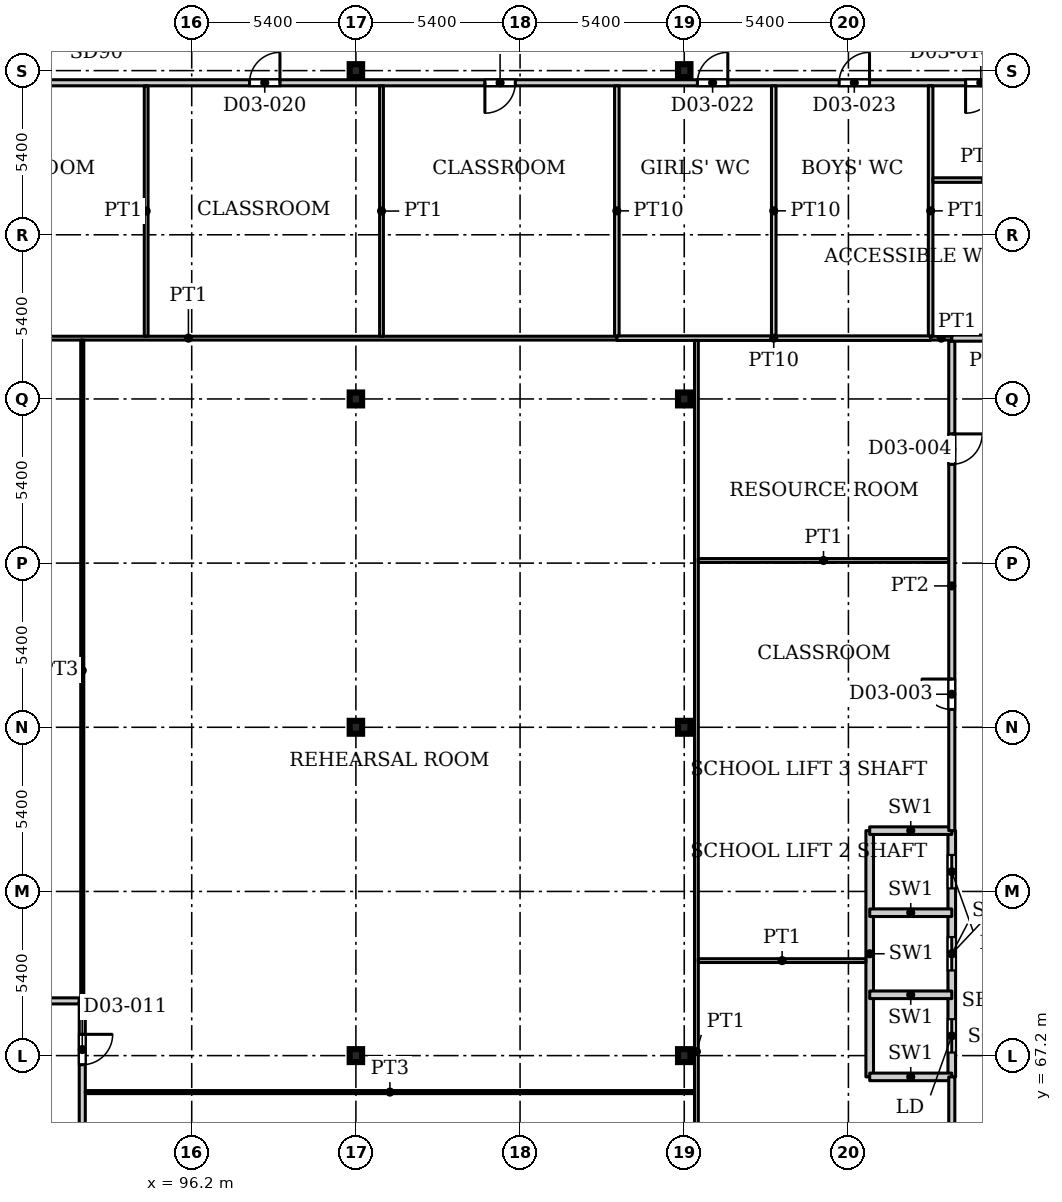
"""IFC4 building model, lengths in metres.
Left out: names, types, materials, properties, quantities, classifications, styles, units other than length and angle.
Written with IfcOpenShell. Run it as: python <this file> out.ifc"""

import sys

from ifc_helpers import new_model, si_unit, direction, frame, frame_2d, origin, origin_2d, place, context, subcontext, project, spatial, rectangle, i_section, extrude, source, transform, mapped, element, fill, save


model = new_model("IFC4")
c1 = context("Model", 3, precision=1e-05, world=origin(), true_north=direction((0.0, 1.0)))
c2 = subcontext(c1, "Body", "Model", "MODEL_VIEW")
j1 = project(units=[si_unit("LENGTHUNIT", "METRE"), si_unit("PLANEANGLEUNIT", "RADIAN")], contexts=[c1])
p1 = place(None, origin())
s1 = spatial("IfcSite", under=j1, at=p1, CompositionType="ELEMENT")
p2 = place(p1, origin())
s2 = spatial("IfcBuilding", under=s1, at=p2, CompositionType="ELEMENT")
p3 = place(p2, frame((0.0, 0.0, 17.0)))
s3 = spatial("IfcBuildingStorey", under=s2, at=p3, CompositionType="ELEMENT", Elevation=17.0)
for number, where, z_axis, x_axis in (
    (1, (101.6, 67.2, 0.0), (0.0, 0.0, 1.0), (1.0, 0.0, 0.0)),
    (2, (112.4, 67.2, 0.0), (0.0, 0.0, 1.0), (1.0, 0.0, 0.0)),
    (3, (101.6, 78.0, 0.0), (0.0, 0.0, 1.0), (1.0, 0.0, 0.0)),
    (4, (112.4, 78.0, 0.0), (0.0, 0.0, 1.0), (1.0, 0.0, 0.0)),
    (5, (101.6, 88.8, 0.0), (0.0, 0.0, 1.0), (1.0, 0.0, 0.0)),
    (6, (112.4, 88.8, 0.0), (0.0, 0.0, 1.0), (1.0, 0.0, 0.0)),
    (7, (101.6, 99.6, 0.0), (0.0, 0.0, 1.0), (1.0, 0.0, 0.0)),
    (8, (112.4, 99.6, 0.0), (0.0, 0.0, 1.0), (1.0, 0.0, 0.0)),
):
    element("IfcColumn", number, at=place(p3, frame(where, z_axis=z_axis, x_axis=x_axis)), inside=s3, PredefinedType="COLUMN", context=c2, shape_type="SweptSolid", body=[
        extrude(i_section(OverallWidth=0.409, OverallDepth=0.425, WebThickness=0.033, FlangeThickness=0.052, FilletRadius=0.013, at=origin_2d()), origin(), (0.0, 0.0, 1.0), 4.5),
    ])
p4 = place(p3, frame((118.5, 66.5, 0.0), z_axis=(0.0, 0.0, 1.0), x_axis=(0.0, 1.0, 0.0)))
e9 = element("IfcWall", 9, at=p4, inside=s3, PredefinedType="PARTITIONING", context=c2, shape_type="SweptSolid", body=[
    extrude(rectangle(XDim=8.1, YDim=0.25, at=frame_2d((4.05, 0.0))), origin(), (0.0, 0.0, 1.0), 4.5),
])
p5 = place(p3, frame((121.2, 66.5, 0.0), z_axis=(0.0, 0.0, 1.0), x_axis=(0.0, 1.0, 0.0)))
e10 = element("IfcWall", 10, at=p5, inside=s3, PredefinedType="PARTITIONING", context=c2, shape_type="SweptSolid", body=[
    extrude(rectangle(XDim=8.1, YDim=0.25, at=frame_2d((4.05, 0.0))), origin(), (0.0, 0.0, 1.0), 4.5),
])
p6 = place(p5, frame((0.8, 0.0, 0.0)))
e11 = element("IfcOpeningElement", 11, at=p6, cuts=e10, PredefinedType="OPENING", context=c2, shape_type="SweptSolid", body=[
    extrude(rectangle(XDim=1.1, YDim=2.2, at=frame_2d((0.55, 1.1))), frame((0.0, 0.135, 0.0), z_axis=(0.0, -1.0, 0.0), x_axis=(1.0, 0.0, 0.0)), (0.0, 0.0, 1.0), 0.27),
])
p7 = place(p5, frame((3.5, 0.0, 0.0)))
e12 = element("IfcOpeningElement", 12, at=p7, cuts=e10, PredefinedType="OPENING", context=c2, shape_type="SweptSolid", body=[
    extrude(rectangle(XDim=1.1, YDim=2.2, at=frame_2d((0.55, 1.1))), frame((0.0, 0.135, 0.0), z_axis=(0.0, -1.0, 0.0), x_axis=(1.0, 0.0, 0.0)), (0.0, 0.0, 1.0), 0.27),
])
p8 = place(p5, frame((6.2, 0.0, 0.0)))
e13 = element("IfcOpeningElement", 13, at=p8, cuts=e10, PredefinedType="OPENING", context=c2, shape_type="SweptSolid", body=[
    extrude(rectangle(XDim=1.1, YDim=2.2, at=frame_2d((0.55, 1.1))), frame((0.0, 0.135, 0.0), z_axis=(0.0, -1.0, 0.0), x_axis=(1.0, 0.0, 0.0)), (0.0, 0.0, 1.0), 0.27),
])
for number, where, z_axis, x_axis in (
    (14, (118.5, 66.5, 0.0), (0.0, 0.0, 1.0), (1.0, 0.0, 0.0)),
    (15, (118.5, 69.2, 0.0), (0.0, 0.0, 1.0), (1.0, 0.0, 0.0)),
    (16, (118.5, 71.9, 0.0), (0.0, 0.0, 1.0), (1.0, 0.0, 0.0)),
    (17, (118.5, 74.6, 0.0), (0.0, 0.0, 1.0), (1.0, 0.0, 0.0)),
):
    element("IfcWall", number, at=place(p3, frame(where, z_axis=z_axis, x_axis=x_axis)), inside=s3, PredefinedType="PARTITIONING", context=c2, shape_type="SweptSolid", body=[
        extrude(rectangle(XDim=2.7, YDim=0.25, at=frame_2d((1.35, 0.0))), origin(), (0.0, 0.0, 1.0), 4.5),
    ])
p9 = place(p3, frame((56.1, 99.2, 0.0), z_axis=(0.0, 0.0, 1.0), x_axis=(1.0, 0.0, 0.0)))
e18 = element("IfcWall", 18, at=p9, inside=s3, PredefinedType="PARTITIONING", context=c2, shape_type="SweptSolid", body=[
    extrude(rectangle(XDim=67.5, YDim=0.2, at=frame_2d((33.75, 0.0))), origin(), (0.0, 0.0, 1.0), 4.18),
])
p10 = place(p9, frame((4.05, 0.0, 0.0)))
e19 = element("IfcOpeningElement", 19, at=p10, cuts=e18, PredefinedType="OPENING", context=c2, shape_type="SweptSolid", body=[
    extrude(rectangle(XDim=1.0, YDim=2.1, at=frame_2d((0.5, 1.05))), frame((0.0, 0.11, 0.0), z_axis=(0.0, -1.0, 0.0), x_axis=(1.0, 0.0, 0.0)), (0.0, 0.0, 1.0), 0.22),
])
p11 = place(p9, frame((65.554, 0.0, 0.0)))
e20 = element("IfcOpeningElement", 20, at=p11, cuts=e18, PredefinedType="OPENING", context=c2, shape_type="SweptSolid", body=[
    extrude(rectangle(XDim=1.0, YDim=2.1, at=frame_2d((0.5, 1.05))), frame((0.0, 0.11, 0.0), z_axis=(0.0, -1.0, 0.0), x_axis=(1.0, 0.0, 0.0)), (0.0, 0.0, 1.0), 0.22),
])
p12 = place(p9, frame((11.589, 0.0, 0.0)))
e21 = element("IfcOpeningElement", 21, at=p12, cuts=e18, PredefinedType="OPENING", context=c2, shape_type="SweptSolid", body=[
    extrude(rectangle(XDim=1.0, YDim=2.1, at=frame_2d((0.5, 1.05))), frame((0.0, 0.11, 0.0), z_axis=(0.0, -1.0, 0.0), x_axis=(1.0, 0.0, 0.0)), (0.0, 0.0, 1.0), 0.22),
])
p13 = place(p9, frame((20.329, 0.0, 0.0)))
e22 = element("IfcOpeningElement", 22, at=p13, cuts=e18, PredefinedType="OPENING", context=c2, shape_type="SweptSolid", body=[
    extrude(rectangle(XDim=1.0, YDim=2.1, at=frame_2d((0.5, 1.05))), frame((0.0, 0.11, 0.0), z_axis=(0.0, -1.0, 0.0), x_axis=(1.0, 0.0, 0.0)), (0.0, 0.0, 1.0), 0.22),
])
p14 = place(p9, frame((27.319, 0.0, 0.0)))
e23 = element("IfcOpeningElement", 23, at=p14, cuts=e18, PredefinedType="OPENING", context=c2, shape_type="SweptSolid", body=[
    extrude(rectangle(XDim=1.0, YDim=2.1, at=frame_2d((0.5, 1.05))), frame((0.0, 0.11, 0.0), z_axis=(0.0, -1.0, 0.0), x_axis=(1.0, 0.0, 0.0)), (0.0, 0.0, 1.0), 0.22),
])
p15 = place(p9, frame((33.262, 0.0, 0.0)))
e24 = element("IfcOpeningElement", 24, at=p15, cuts=e18, PredefinedType="OPENING", context=c2, shape_type="SweptSolid", body=[
    extrude(rectangle(XDim=1.0, YDim=2.1, at=frame_2d((0.5, 1.05))), frame((0.0, 0.11, 0.0), z_axis=(0.0, -1.0, 0.0), x_axis=(1.0, 0.0, 0.0)), (0.0, 0.0, 1.0), 0.22),
])
p16 = place(p9, frame((42.002, 0.0, 0.0)))
e25 = element("IfcOpeningElement", 25, at=p16, cuts=e18, PredefinedType="OPENING", context=c2, shape_type="SweptSolid", body=[
    extrude(rectangle(XDim=1.0, YDim=2.1, at=frame_2d((0.5, 1.05))), frame((0.0, 0.11, 0.0), z_axis=(0.0, -1.0, 0.0), x_axis=(1.0, 0.0, 0.0)), (0.0, 0.0, 1.0), 0.22),
])
p17 = place(p9, frame((49.743, 0.0, 0.0)))
e26 = element("IfcOpeningElement", 26, at=p17, cuts=e18, PredefinedType="OPENING", context=c2, shape_type="SweptSolid", body=[
    extrude(rectangle(XDim=1.0, YDim=2.1, at=frame_2d((0.5, 1.05))), frame((0.0, 0.11, 0.0), z_axis=(0.0, -1.0, 0.0), x_axis=(1.0, 0.0, 0.0)), (0.0, 0.0, 1.0), 0.22),
])
p18 = place(p9, frame((56.733, 0.0, 0.0)))
e27 = element("IfcOpeningElement", 27, at=p18, cuts=e18, PredefinedType="OPENING", context=c2, shape_type="SweptSolid", body=[
    extrude(rectangle(XDim=1.0, YDim=2.1, at=frame_2d((0.5, 1.05))), frame((0.0, 0.11, 0.0), z_axis=(0.0, -1.0, 0.0), x_axis=(1.0, 0.0, 0.0)), (0.0, 0.0, 1.0), 0.22),
])
p19 = place(p9, frame((61.394, 0.0, 0.0)))
e28 = element("IfcOpeningElement", 28, at=p19, cuts=e18, PredefinedType="OPENING", context=c2, shape_type="SweptSolid", body=[
    extrude(rectangle(XDim=1.0, YDim=2.1, at=frame_2d((0.5, 1.05))), frame((0.0, 0.11, 0.0), z_axis=(0.0, -1.0, 0.0), x_axis=(1.0, 0.0, 0.0)), (0.0, 0.0, 1.0), 0.22),
])
p20 = place(p3, frame((67.5, 69.0, 0.0), z_axis=(0.0, 0.0, 1.0), x_axis=(1.0, 0.0, 0.0)))
e29 = element("IfcWall", 29, at=p20, inside=s3, PredefinedType="PARTITIONING", context=c2, shape_type="SweptSolid", body=[
    extrude(rectangle(XDim=25.0, YDim=0.2, at=frame_2d((12.5, 0.0))), origin(), (0.0, 0.0, 1.0), 4.18),
])
p21 = place(p20, frame((11.4, 0.0, 0.0)))
e30 = element("IfcOpeningElement", 30, at=p21, cuts=e29, PredefinedType="OPENING", context=c2, shape_type="SweptSolid", body=[
    extrude(rectangle(XDim=2.0, YDim=2.1, at=frame_2d((1.0, 1.05))), frame((0.0, 0.11, 0.0), z_axis=(0.0, -1.0, 0.0), x_axis=(1.0, 0.0, 0.0)), (0.0, 0.0, 1.0), 0.22),
])
p22 = place(p20, frame((4.3, 0.0, 0.0)))
e31 = element("IfcOpeningElement", 31, at=p22, cuts=e29, PredefinedType="OPENING", context=c2, shape_type="SweptSolid", body=[
    extrude(rectangle(XDim=1.8, YDim=2.1, at=frame_2d((0.9, 1.05))), frame((0.0, 0.11, 0.0), z_axis=(0.0, -1.0, 0.0), x_axis=(1.0, 0.0, 0.0)), (0.0, 0.0, 1.0), 0.22),
])
p23 = place(p20, frame((18.9, 0.0, 0.0)))
e32 = element("IfcOpeningElement", 32, at=p23, cuts=e29, PredefinedType="OPENING", context=c2, shape_type="SweptSolid", body=[
    extrude(rectangle(XDim=1.8, YDim=2.1, at=frame_2d((0.9, 1.05))), frame((0.0, 0.11, 0.0), z_axis=(0.0, -1.0, 0.0), x_axis=(1.0, 0.0, 0.0)), (0.0, 0.0, 1.0), 0.22),
])
p24 = place(p3, frame((82.0, 90.8, 0.0), z_axis=(0.0, 0.0, 1.0), x_axis=(1.0, 0.0, 0.0)))
e33 = element("IfcWall", 33, at=p24, inside=s3, PredefinedType="PARTITIONING", context=c2, shape_type="SweptSolid", body=[
    extrude(rectangle(XDim=28.183, YDim=0.125, at=frame_2d((14.092, 0.0))), origin(), (0.0, 0.0, 1.0), 4.18),
])
p25 = place(p3, frame((92.6, 48.1, 0.0), z_axis=(0.0, 0.0, 1.0), x_axis=(0.0, 1.0, 0.0)))
e34 = element("IfcWall", 34, at=p25, inside=s3, PredefinedType="PARTITIONING", context=c2, shape_type="SweptSolid", body=[
    extrude(rectangle(XDim=20.9, YDim=0.2, at=frame_2d((10.45, 0.0))), origin(), (0.0, 0.0, 1.0), 4.18),
])
p26 = place(p25, frame((8.05, 0.0, 0.0)))
e35 = element("IfcOpeningElement", 35, at=p26, cuts=e34, PredefinedType="OPENING", context=c2, shape_type="SweptSolid", body=[
    extrude(rectangle(XDim=1.8, YDim=2.1, at=frame_2d((0.9, 1.05))), frame((0.0, 0.11, 0.0), z_axis=(0.0, -1.0, 0.0), x_axis=(1.0, 0.0, 0.0)), (0.0, 0.0, 1.0), 0.22),
])
p27 = place(p25, frame((18.8, 0.0, 0.0)))
e36 = element("IfcOpeningElement", 36, at=p27, cuts=e34, PredefinedType="OPENING", context=c2, shape_type="SweptSolid", body=[
    extrude(rectangle(XDim=1.0, YDim=2.1, at=frame_2d((0.5, 1.05))), frame((0.0, 0.11, 0.0), z_axis=(0.0, -1.0, 0.0), x_axis=(1.0, 0.0, 0.0)), (0.0, 0.0, 1.0), 0.22),
])
p28 = place(p3, frame((92.6, 69.0, 0.0), z_axis=(0.0, 0.0, 1.0), x_axis=(0.0, 1.0, 0.0)))
e37 = element("IfcWall", 37, at=p28, inside=s3, PredefinedType="PARTITIONING", context=c2, shape_type="SweptSolid", body=[
    extrude(rectangle(XDim=21.738, YDim=0.1, at=frame_2d((10.869, 0.0))), origin(), (0.0, 0.0, 1.0), 4.18),
])
p29 = place(p3, frame((92.7, 66.0, 0.0), z_axis=(0.0, 0.0, 1.0), x_axis=(1.0, 0.0, 0.0)))
e38 = element("IfcWall", 38, at=p29, inside=s3, PredefinedType="PARTITIONING", context=c2, shape_type="SweptSolid", body=[
    extrude(rectangle(XDim=20.038, YDim=0.1, at=frame_2d((10.019, 0.0))), origin(), (0.0, 0.0, 1.0), 4.18),
])
for number, where, z_axis, x_axis in (
    (39, (94.702, 90.862, 0.0), (0.0, 0.0, 1.0), (0.0, 1.0, 0.0)),
    (40, (102.443, 90.862, 0.0), (0.0, 0.0, 1.0), (0.0, 1.0, 0.0)),
):
    element("IfcWall", number, at=place(p3, frame(where, z_axis=z_axis, x_axis=x_axis)), inside=s3, PredefinedType="PARTITIONING", context=c2, shape_type="SweptSolid", body=[
        extrude(rectangle(XDim=8.238, YDim=0.125, at=frame_2d((4.119, 0.0))), origin(), (0.0, 0.0, 1.0), 4.18),
    ])
p30 = place(p3, frame((110.183, 90.8, 0.0), z_axis=(0.0, 0.0, 1.0), x_axis=(1.0, 0.0, 0.0)))
e41 = element("IfcWall", 41, at=p30, inside=s3, PredefinedType="PARTITIONING", context=c2, shape_type="SweptSolid", body=[
    extrude(rectangle(XDim=10.321, YDim=0.15, at=frame_2d((5.16, 0.0))), origin(), (0.0, 0.0, 1.0), 4.18),
])
p31 = place(p3, frame((110.183, 90.875, 0.0), z_axis=(0.0, 0.0, 1.0), x_axis=(0.0, 1.0, 0.0)))
e42 = element("IfcWall", 42, at=p31, inside=s3, PredefinedType="PARTITIONING", context=c2, shape_type="SweptSolid", body=[
    extrude(rectangle(XDim=8.225, YDim=0.15, at=frame_2d((4.113, 0.0))), origin(), (0.0, 0.0, 1.0), 4.18),
])
p32 = place(p3, frame((112.8, 43.938, 0.0), z_axis=(0.0, 0.0, 1.0), x_axis=(0.0, 1.0, 0.0)))
e43 = element("IfcWall", 43, at=p32, inside=s3, PredefinedType="PARTITIONING", context=c2, shape_type="SweptSolid", body=[
    extrude(rectangle(XDim=46.787, YDim=0.125, at=frame_2d((23.394, 0.0))), origin(), (0.0, 0.0, 1.0), 4.18),
])
p33 = place(p3, frame((112.862, 70.325, 0.0), z_axis=(0.0, 0.0, 1.0), x_axis=(1.0, 0.0, 0.0)))
e44 = element("IfcWall", 44, at=p33, inside=s3, PredefinedType="PARTITIONING", context=c2, shape_type="SweptSolid", body=[
    extrude(rectangle(XDim=5.514, YDim=0.125, at=frame_2d((2.757, 0.0))), origin(), (0.0, 0.0, 1.0), 4.18),
])
p34 = place(p3, frame((112.862, 83.487, 0.0), z_axis=(0.0, 0.0, 1.0), x_axis=(1.0, 0.0, 0.0)))
e45 = element("IfcWall", 45, at=p34, inside=s3, PredefinedType="PARTITIONING", context=c2, shape_type="SweptSolid", body=[
    extrude(rectangle(XDim=8.238, YDim=0.125, at=frame_2d((4.119, 0.0))), origin(), (0.0, 0.0, 1.0), 4.18),
])
p35 = place(p3, frame((115.344, 90.875, 0.0), z_axis=(0.0, 0.0, 1.0), x_axis=(0.0, 1.0, 0.0)))
e46 = element("IfcWall", 46, at=p35, inside=s3, PredefinedType="PARTITIONING", context=c2, shape_type="SweptSolid", body=[
    extrude(rectangle(XDim=8.225, YDim=0.15, at=frame_2d((4.113, 0.0))), origin(), (0.0, 0.0, 1.0), 4.18),
])
p36 = place(p3, frame((120.504, 90.8, 0.0), z_axis=(0.0, 0.0, 1.0), x_axis=(1.0, 0.0, 0.0)))
e47 = element("IfcWall", 47, at=p36, inside=s3, PredefinedType="PARTITIONING", context=c2, shape_type="SweptSolid", body=[
    extrude(rectangle(XDim=0.696, YDim=0.125, at=frame_2d((0.348, 0.0))), origin(), (0.0, 0.0, 1.0), 4.18),
])
p37 = place(p3, frame((120.504, 90.875, 0.0), z_axis=(0.0, 0.0, 1.0), x_axis=(0.0, 1.0, 0.0)))
e48 = element("IfcWall", 48, at=p37, inside=s3, PredefinedType="PARTITIONING", context=c2, shape_type="SweptSolid", body=[
    extrude(rectangle(XDim=8.225, YDim=0.15, at=frame_2d((4.113, 0.0))), origin(), (0.0, 0.0, 1.0), 4.18),
])
p38 = place(p3, frame((120.579, 96.0, 0.0), z_axis=(0.0, 0.0, 1.0), x_axis=(1.0, 0.0, 0.0)))
e49 = element("IfcWall", 49, at=p38, inside=s3, PredefinedType="PARTITIONING", context=c2, shape_type="SweptSolid", body=[
    extrude(rectangle(XDim=3.45, YDim=0.15, at=frame_2d((1.725, 0.0))), origin(), (0.0, 0.0, 1.0), 4.18),
])
p39 = place(p3, frame((121.2, 43.9, 0.0), z_axis=(0.0, 0.0, 1.0), x_axis=(0.0, 1.0, 0.0)))
e50 = element("IfcWall", 50, at=p39, inside=s3, PredefinedType="PARTITIONING", context=c2, shape_type="SweptSolid", body=[
    extrude(rectangle(XDim=22.6, YDim=0.2, at=frame_2d((11.3, 0.0))), origin(), (0.0, 0.0, 1.0), 4.18),
])
p40 = place(p39, frame((6.112, 0.0, 0.0)))
e51 = element("IfcOpeningElement", 51, at=p40, cuts=e50, PredefinedType="OPENING", context=c2, shape_type="SweptSolid", body=[
    extrude(rectangle(XDim=1.0, YDim=2.1, at=frame_2d((0.5, 1.05))), frame((0.0, 0.11, 0.0), z_axis=(0.0, -1.0, 0.0), x_axis=(1.0, 0.0, 0.0)), (0.0, 0.0, 1.0), 0.22),
])
p41 = place(p39, frame((17.45, 0.0, 0.0)))
e52 = element("IfcOpeningElement", 52, at=p41, cuts=e50, PredefinedType="OPENING", context=c2, shape_type="SweptSolid", body=[
    extrude(rectangle(XDim=1.0, YDim=2.1, at=frame_2d((0.5, 1.05))), frame((0.0, 0.11, 0.0), z_axis=(0.0, -1.0, 0.0), x_axis=(1.0, 0.0, 0.0)), (0.0, 0.0, 1.0), 0.22),
])
p42 = place(p3, frame((121.2, 74.6, 0.0), z_axis=(0.0, 0.0, 1.0), x_axis=(0.0, 1.0, 0.0)))
e53 = element("IfcWall", 53, at=p42, inside=s3, PredefinedType="PARTITIONING", context=c2, shape_type="SweptSolid", body=[
    extrude(rectangle(XDim=16.1, YDim=0.2, at=frame_2d((8.05, 0.0))), origin(), (0.0, 0.0, 1.0), 4.18),
])
p43 = place(p42, frame((3.987, 0.0, 0.0)))
e54 = element("IfcOpeningElement", 54, at=p43, cuts=e53, PredefinedType="OPENING", context=c2, shape_type="SweptSolid", body=[
    extrude(rectangle(XDim=1.0, YDim=2.1, at=frame_2d((0.5, 1.05))), frame((0.0, 0.11, 0.0), z_axis=(0.0, -1.0, 0.0), x_axis=(1.0, 0.0, 0.0)), (0.0, 0.0, 1.0), 0.22),
])
p44 = place(p42, frame((12.05, 0.0, 0.0)))
e55 = element("IfcOpeningElement", 55, at=p44, cuts=e53, PredefinedType="OPENING", context=c2, shape_type="SweptSolid", body=[
    extrude(rectangle(XDim=1.0, YDim=2.1, at=frame_2d((0.5, 1.05))), frame((0.0, 0.11, 0.0), z_axis=(0.0, -1.0, 0.0), x_axis=(1.0, 0.0, 0.0)), (0.0, 0.0, 1.0), 0.22),
])
p45 = place(p3, frame((121.2, 90.8, 0.0), z_axis=(0.0, 0.0, 1.0), x_axis=(1.0, 0.0, 0.0)))
e56 = element("IfcWall", 56, at=p45, inside=s3, PredefinedType="PARTITIONING", context=c2, shape_type="SweptSolid", body=[
    extrude(rectangle(XDim=2.4, YDim=0.2, at=frame_2d((1.2, 0.0))), origin(), (0.0, 0.0, 1.0), 4.18),
])
m1 = source(origin(), c2, "Body", "SweptSolid", [
    extrude(rectangle(XDim=1.1, YDim=2.2, at=frame_2d((0.55, 1.1))), frame((0.0, 0.025, 0.0), z_axis=(0.0, -1.0, 0.0), x_axis=(1.0, 0.0, 0.0)), (0.0, 0.0, 1.0), 0.05),
])
p46 = place(p6, origin())
e57 = element("IfcDoor", 57, at=p46, inside=s3, OperationType="SLIDING_TO_LEFT", PredefinedType="DOOR", context=c2, shape_type="MappedRepresentation", body=[
    mapped(m1, transform((0.0, 0.0, 0.0), x_axis=(1.0, 0.0, 0.0), y_axis=(0.0, 1.0, 0.0), z_axis=(0.0, 0.0, 1.0), scale=1.0)),
])
fill(e11, e57)
p47 = place(p7, origin())
e58 = element("IfcDoor", 58, at=p47, inside=s3, OperationType="SLIDING_TO_LEFT", PredefinedType="DOOR", context=c2, shape_type="MappedRepresentation", body=[
    mapped(m1, transform((0.0, 0.0, 0.0), x_axis=(1.0, 0.0, 0.0), y_axis=(0.0, 1.0, 0.0), z_axis=(0.0, 0.0, 1.0), scale=1.0)),
])
fill(e12, e58)
p48 = place(p8, origin())
e59 = element("IfcDoor", 59, at=p48, inside=s3, OperationType="SLIDING_TO_LEFT", PredefinedType="DOOR", context=c2, shape_type="MappedRepresentation", body=[
    mapped(m1, transform((0.0, 0.0, 0.0), x_axis=(1.0, 0.0, 0.0), y_axis=(0.0, 1.0, 0.0), z_axis=(0.0, 0.0, 1.0), scale=1.0)),
])
fill(e13, e59)
m2 = source(origin(), c2, "Body", "SweptSolid", [
    extrude(rectangle(XDim=1.0, YDim=2.1, at=frame_2d((0.5, 1.05))), frame((0.0, 0.025, 0.0), z_axis=(0.0, -1.0, 0.0), x_axis=(1.0, 0.0, 0.0)), (0.0, 0.0, 1.0), 0.05),
])
p49 = place(p43, origin())
e60 = element("IfcDoor", 60, at=p49, inside=s3, OperationType="SINGLE_SWING_LEFT", PredefinedType="DOOR", context=c2, shape_type="MappedRepresentation", body=[
    mapped(m2, transform((0.0, 0.0, 0.0), x_axis=(1.0, 0.0, 0.0), y_axis=(0.0, 1.0, 0.0), z_axis=(0.0, 0.0, 1.0), scale=1.0)),
])
fill(e54, e60)
p50 = place(p44, origin())
e61 = element("IfcDoor", 61, at=p50, inside=s3, OperationType="SINGLE_SWING_RIGHT", PredefinedType="DOOR", context=c2, shape_type="MappedRepresentation", body=[
    mapped(m2, transform((0.0, 0.0, 0.0), x_axis=(1.0, 0.0, 0.0), y_axis=(0.0, 1.0, 0.0), z_axis=(0.0, 0.0, 1.0), scale=1.0)),
])
fill(e55, e61)
p51 = place(p27, origin())
e62 = element("IfcDoor", 62, at=p51, inside=s3, OperationType="SINGLE_SWING_RIGHT", PredefinedType="DOOR", context=c2, shape_type="MappedRepresentation", body=[
    mapped(m2, transform((0.0, 0.0, 0.0), x_axis=(1.0, 0.0, 0.0), y_axis=(0.0, 1.0, 0.0), z_axis=(0.0, 0.0, 1.0), scale=1.0)),
])
fill(e36, e62)
p52 = place(p11, origin())
e63 = element("IfcDoor", 63, at=p52, inside=s3, OperationType="SINGLE_SWING_RIGHT", PredefinedType="DOOR", context=c2, shape_type="MappedRepresentation", body=[
    mapped(m2, transform((0.0, 0.0, 0.0), x_axis=(1.0, 0.0, 0.0), y_axis=(0.0, 1.0, 0.0), z_axis=(0.0, 0.0, 1.0), scale=1.0)),
])
fill(e20, e63)
p53 = place(p16, origin())
e64 = element("IfcDoor", 64, at=p53, inside=s3, OperationType="SINGLE_SWING_LEFT", PredefinedType="DOOR", context=c2, shape_type="MappedRepresentation", body=[
    mapped(m2, transform((0.0, 0.0, 0.0), x_axis=(1.0, 0.0, 0.0), y_axis=(0.0, 1.0, 0.0), z_axis=(0.0, 0.0, 1.0), scale=1.0)),
])
fill(e25, e64)
p54 = place(p17, origin())
e65 = element("IfcDoor", 65, at=p54, inside=s3, OperationType="SINGLE_SWING_RIGHT", PredefinedType="DOOR", context=c2, shape_type="MappedRepresentation", body=[
    mapped(m2, transform((0.0, 0.0, 0.0), x_axis=(1.0, 0.0, 0.0), y_axis=(0.0, 1.0, 0.0), z_axis=(0.0, 0.0, 1.0), scale=1.0)),
])
fill(e26, e65)
p55 = place(p18, origin())
e66 = element("IfcDoor", 66, at=p55, inside=s3, OperationType="SINGLE_SWING_LEFT", PredefinedType="DOOR", context=c2, shape_type="MappedRepresentation", body=[
    mapped(m2, transform((0.0, 0.0, 0.0), x_axis=(1.0, 0.0, 0.0), y_axis=(0.0, 1.0, 0.0), z_axis=(0.0, 0.0, 1.0), scale=1.0)),
])
fill(e27, e66)
p56 = place(p19, origin())
e67 = element("IfcDoor", 67, at=p56, inside=s3, OperationType="SINGLE_SWING_LEFT", PredefinedType="DOOR", context=c2, shape_type="MappedRepresentation", body=[
    mapped(m2, transform((0.0, 0.0, 0.0), x_axis=(1.0, 0.0, 0.0), y_axis=(0.0, 1.0, 0.0), z_axis=(0.0, 0.0, 1.0), scale=1.0)),
])
fill(e28, e67)
save(model, sys.argv[1])
